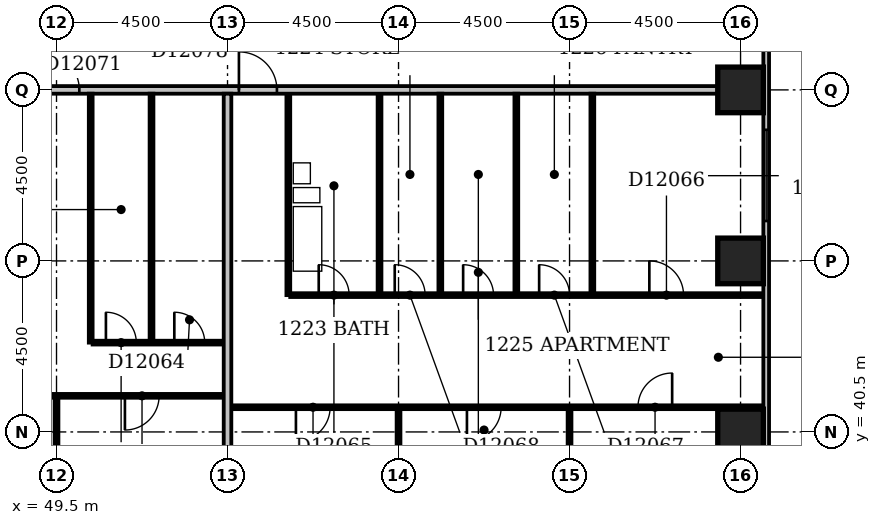
"""IFC4 building model, lengths in metres.
Left out: names, types, materials, properties, quantities, classifications, styles, units other than length and angle.
Written with IfcOpenShell. Run it as: python <this file> out.ifc"""

import sys

from ifc_helpers import new_model, si_unit, direction, frame, frame_2d, origin, origin_2d, place, context, subcontext, project, spatial, rectangle, extrude, element, fill, save


model = new_model("IFC4")
c1 = context("Model", 3, precision=1e-05, world=origin(), true_north=direction((0.0, 1.0)))
c2 = subcontext(c1, "Body", "Model", "MODEL_VIEW")
j1 = project(units=[si_unit("LENGTHUNIT", "METRE"), si_unit("PLANEANGLEUNIT", "RADIAN")], contexts=[c1])
p1 = place(None, origin())
s1 = spatial("IfcSite", under=j1, at=p1, CompositionType="ELEMENT")
p2 = place(p1, origin())
s2 = spatial("IfcBuilding", under=s1, at=p2, CompositionType="ELEMENT")
p3 = place(p2, frame((0.0, 0.0, 54.2)))
s3 = spatial("IfcBuildingStorey", under=s2, at=p3, CompositionType="ELEMENT", Elevation=54.2)
for number, where, z_axis, x_axis in (
    (1, (67.5, 40.5, -0.3), (0.0, 0.0, 1.0), (1.0, 0.0, 0.0)),
    (2, (67.5, 45.0, -0.3), (0.0, 0.0, 1.0), (1.0, 0.0, 0.0)),
    (3, (67.5, 49.5, -0.3), (0.0, 0.0, 1.0), (1.0, 0.0, 0.0)),
):
    element("IfcColumn", number, at=place(p3, frame(where, z_axis=z_axis, x_axis=x_axis)), inside=s3, PredefinedType="COLUMN", context=c2, shape_type="SweptSolid", body=[
        extrude(rectangle(XDim=1.2, YDim=1.2, at=origin_2d()), origin(), (0.0, 0.0, 1.0), 3.6),
    ])
p4 = place(p3, frame((68.175, 35.4, 0.0), z_axis=(0.0, 0.0, 1.0), x_axis=(0.0, 1.0, 0.0)))
e4 = element("IfcWall", 4, at=p4, inside=s3, PredefinedType="STANDARD", context=c2, shape_type="SweptSolid", body=[
    extrude(rectangle(XDim=23.85, YDim=0.15, at=frame_2d((11.925, 0.0))), origin(), (0.0, 0.0, 1.0), 2.7),
])
p5 = place(p4, frame((1.53, 0.0, 0.6)))
e5 = element("IfcOpeningElement", 5, at=p5, cuts=e4, PredefinedType="OPENING", context=c2, shape_type="SweptSolid", body=[
    extrude(rectangle(XDim=1.5, YDim=1.8, at=frame_2d((0.75, 0.9))), frame((0.0, 0.087, 0.0), z_axis=(0.0, -1.0, 0.0), x_axis=(1.0, 0.0, 0.0)), (0.0, 0.0, 1.0), 0.174),
])
p6 = place(p4, frame((10.65, 0.0, 0.6)))
e6 = element("IfcOpeningElement", 6, at=p6, cuts=e4, PredefinedType="OPENING", context=c2, shape_type="SweptSolid", body=[
    extrude(rectangle(XDim=2.4, YDim=1.8, at=frame_2d((1.2, 0.9))), frame((0.0, 0.087, 0.0), z_axis=(0.0, -1.0, 0.0), x_axis=(1.0, 0.0, 0.0)), (0.0, 0.0, 1.0), 0.174),
])
p7 = place(p4, frame((19.47, 0.0, 0.6)))
e7 = element("IfcOpeningElement", 7, at=p7, cuts=e4, PredefinedType="OPENING", context=c2, shape_type="SweptSolid", body=[
    extrude(rectangle(XDim=0.45, YDim=1.8, at=frame_2d((0.225, 0.9))), frame((0.0, 0.087, 0.0), z_axis=(0.0, -1.0, 0.0), x_axis=(1.0, 0.0, 0.0)), (0.0, 0.0, 1.0), 0.174),
])
p8 = place(p4, frame((21.601, 0.0, 0.6)))
e8 = element("IfcOpeningElement", 8, at=p8, cuts=e4, PredefinedType="OPENING", context=c2, shape_type="SweptSolid", body=[
    extrude(rectangle(XDim=0.6, YDim=1.8, at=frame_2d((0.3, 0.9))), frame((0.0, 0.087, 0.0), z_axis=(0.0, -1.0, 0.0), x_axis=(1.0, 0.0, 0.0)), (0.0, 0.0, 1.0), 0.174),
])
p9 = place(p3, frame((49.5, 36.6, 0.0), z_axis=(0.0, 0.0, 1.0), x_axis=(0.0, 1.0, 0.0)))
e9 = element("IfcWall", 9, at=p9, inside=s3, PredefinedType="PARTITIONING", context=c2, shape_type="SweptSolid", body=[
    extrude(rectangle(XDim=4.8, YDim=0.1, at=frame_2d((2.4, 0.0))), origin(), (0.0, 0.0, 1.0), 3.3),
])
p10 = place(p3, frame((54.0, 36.6, 0.0), z_axis=(0.0, 0.0, 1.0), x_axis=(0.0, 1.0, 0.0)))
e10 = element("IfcWall", 10, at=p10, inside=s3, PredefinedType="PARTITIONING", context=c2, shape_type="SweptSolid", body=[
    extrude(rectangle(XDim=12.8, YDim=0.2, at=frame_2d((6.4, 0.0))), origin(), (0.0, 0.0, 1.0), 2.6),
])
p11 = place(p3, frame((58.5, 36.6, 0.0), z_axis=(0.0, 0.0, 1.0), x_axis=(0.0, 1.0, 0.0)))
e11 = element("IfcWall", 11, at=p11, inside=s3, PredefinedType="PARTITIONING", context=c2, shape_type="SweptSolid", body=[
    extrude(rectangle(XDim=4.5, YDim=0.1, at=frame_2d((2.25, 0.0))), origin(), (0.0, 0.0, 1.0), 3.3),
])
p12 = place(p3, frame((63.0, 36.6, 0.0), z_axis=(0.0, 0.0, 1.0), x_axis=(0.0, 1.0, 0.0)))
e12 = element("IfcWall", 12, at=p12, inside=s3, PredefinedType="PARTITIONING", context=c2, shape_type="SweptSolid", body=[
    extrude(rectangle(XDim=4.5, YDim=0.1, at=frame_2d((2.25, 0.0))), origin(), (0.0, 0.0, 1.0), 2.4),
])
p13 = place(p3, frame((54.1, 41.15, 0.0), z_axis=(0.0, 0.0, 1.0), x_axis=(1.0, 0.0, 0.0)))
e13 = element("IfcWall", 13, at=p13, inside=s3, PredefinedType="PARTITIONING", context=c2, shape_type="SweptSolid", body=[
    extrude(rectangle(XDim=14.0, YDim=0.1, at=frame_2d((7.0, 0.0))), origin(), (0.0, 0.0, 1.0), 3.3),
])
p14 = place(p13, frame((1.7, 0.0, 0.0)))
e14 = element("IfcOpeningElement", 14, at=p14, cuts=e13, PredefinedType="OPENING", context=c2, shape_type="SweptSolid", body=[
    extrude(rectangle(XDim=0.9, YDim=2.1, at=frame_2d((0.45, 1.05))), frame((0.0, 0.062, 0.0), z_axis=(0.0, -1.0, 0.0), x_axis=(1.0, 0.0, 0.0)), (0.0, 0.0, 1.0), 0.124),
])
p15 = place(p13, frame((6.2, 0.0, 0.0)))
e15 = element("IfcOpeningElement", 15, at=p15, cuts=e13, PredefinedType="OPENING", context=c2, shape_type="SweptSolid", body=[
    extrude(rectangle(XDim=0.9, YDim=2.1, at=frame_2d((0.45, 1.05))), frame((0.0, 0.062, 0.0), z_axis=(0.0, -1.0, 0.0), x_axis=(1.0, 0.0, 0.0)), (0.0, 0.0, 1.0), 0.124),
])
p16 = place(p13, frame((10.7, 0.0, 0.0)))
e16 = element("IfcOpeningElement", 16, at=p16, cuts=e13, PredefinedType="OPENING", context=c2, shape_type="SweptSolid", body=[
    extrude(rectangle(XDim=0.9, YDim=2.1, at=frame_2d((0.45, 1.05))), frame((0.0, 0.062, 0.0), z_axis=(0.0, -1.0, 0.0), x_axis=(1.0, 0.0, 0.0)), (0.0, 0.0, 1.0), 0.124),
])
p17 = place(p3, frame((40.6, 41.45, 0.0), z_axis=(0.0, 0.0, 1.0), x_axis=(1.0, 0.0, 0.0)))
e17 = element("IfcWall", 17, at=p17, inside=s3, PredefinedType="PARTITIONING", context=c2, shape_type="SweptSolid", body=[
    extrude(rectangle(XDim=13.3, YDim=0.1, at=frame_2d((6.65, 0.0))), origin(), (0.0, 0.0, 1.0), 3.3),
])
p18 = place(p17, frame((1.7, 0.0, 0.0)))
e18 = element("IfcOpeningElement", 18, at=p18, cuts=e17, PredefinedType="OPENING", context=c2, shape_type="SweptSolid", body=[
    extrude(rectangle(XDim=0.9, YDim=2.1, at=frame_2d((0.45, 1.05))), frame((0.0, 0.062, 0.0), z_axis=(0.0, -1.0, 0.0), x_axis=(1.0, 0.0, 0.0)), (0.0, 0.0, 1.0), 0.124),
])
p19 = place(p17, frame((6.2, 0.0, 0.0)))
e19 = element("IfcOpeningElement", 19, at=p19, cuts=e17, PredefinedType="OPENING", context=c2, shape_type="SweptSolid", body=[
    extrude(rectangle(XDim=0.9, YDim=2.1, at=frame_2d((0.45, 1.05))), frame((0.0, 0.062, 0.0), z_axis=(0.0, -1.0, 0.0), x_axis=(1.0, 0.0, 0.0)), (0.0, 0.0, 1.0), 0.124),
])
p20 = place(p17, frame((10.7, 0.0, 0.0)))
e20 = element("IfcOpeningElement", 20, at=p20, cuts=e17, PredefinedType="OPENING", context=c2, shape_type="SweptSolid", body=[
    extrude(rectangle(XDim=0.9, YDim=2.1, at=frame_2d((0.45, 1.05))), frame((0.0, 0.062, 0.0), z_axis=(0.0, -1.0, 0.0), x_axis=(1.0, 0.0, 0.0)), (0.0, 0.0, 1.0), 0.124),
])
p21 = place(p3, frame((50.4, 42.85, 0.0), z_axis=(0.0, 0.0, 1.0), x_axis=(0.0, 1.0, 0.0)))
e21 = element("IfcWall", 21, at=p21, inside=s3, PredefinedType="PARTITIONING", context=c2, shape_type="SweptSolid", body=[
    extrude(rectangle(XDim=6.55, YDim=0.1, at=frame_2d((3.275, 0.0))), origin(), (0.0, 0.0, 1.0), 3.3),
])
p22 = place(p3, frame((50.45, 42.85, 0.0), z_axis=(0.0, 0.0, 1.0), x_axis=(1.0, 0.0, 0.0)))
e22 = element("IfcWall", 22, at=p22, inside=s3, PredefinedType="PARTITIONING", context=c2, shape_type="SweptSolid", body=[
    extrude(rectangle(XDim=3.45, YDim=0.1, at=frame_2d((1.725, 0.0))), origin(), (0.0, 0.0, 1.0), 3.3),
])
p23 = place(p22, frame((0.35, 0.0, 0.0)))
e23 = element("IfcOpeningElement", 23, at=p23, cuts=e22, PredefinedType="OPENING", context=c2, shape_type="SweptSolid", body=[
    extrude(rectangle(XDim=0.8, YDim=2.1, at=frame_2d((0.4, 1.05))), frame((0.0, 0.062, 0.0), z_axis=(0.0, -1.0, 0.0), x_axis=(1.0, 0.0, 0.0)), (0.0, 0.0, 1.0), 0.124),
])
p24 = place(p22, frame((2.15, 0.0, 0.0)))
e24 = element("IfcOpeningElement", 24, at=p24, cuts=e22, PredefinedType="OPENING", context=c2, shape_type="SweptSolid", body=[
    extrude(rectangle(XDim=0.8, YDim=2.1, at=frame_2d((0.4, 1.05))), frame((0.0, 0.062, 0.0), z_axis=(0.0, -1.0, 0.0), x_axis=(1.0, 0.0, 0.0)), (0.0, 0.0, 1.0), 0.124),
])
p25 = place(p3, frame((52.0, 42.9, 0.0), z_axis=(0.0, 0.0, 1.0), x_axis=(0.0, 1.0, 0.0)))
e25 = element("IfcWall", 25, at=p25, inside=s3, PredefinedType="PARTITIONING", context=c2, shape_type="SweptSolid", body=[
    extrude(rectangle(XDim=6.5, YDim=0.1, at=frame_2d((3.25, 0.0))), origin(), (0.0, 0.0, 1.0), 3.3),
])
p26 = place(p3, frame((55.6, 44.1, 0.0), z_axis=(0.0, 0.0, 1.0), x_axis=(0.0, 1.0, 0.0)))
e26 = element("IfcWall", 26, at=p26, inside=s3, PredefinedType="PLUMBINGWALL", context=c2, shape_type="SweptSolid", body=[
    extrude(rectangle(XDim=5.3, YDim=0.1, at=frame_2d((2.65, 0.0))), origin(), (0.0, 0.0, 1.0), 3.3),
])
p27 = place(p3, frame((55.65, 44.1, 0.0), z_axis=(0.0, 0.0, 1.0), x_axis=(1.0, 0.0, 0.0)))
e27 = element("IfcWall", 27, at=p27, inside=s3, PredefinedType="PARTITIONING", context=c2, shape_type="SweptSolid", body=[
    extrude(rectangle(XDim=12.45, YDim=0.1, at=frame_2d((6.225, 0.0))), origin(), (0.0, 0.0, 1.0), 3.3),
])
p28 = place(p27, frame((0.75, 0.0, 0.0)))
e28 = element("IfcOpeningElement", 28, at=p28, cuts=e27, PredefinedType="OPENING", context=c2, shape_type="SweptSolid", body=[
    extrude(rectangle(XDim=0.8, YDim=2.1, at=frame_2d((0.4, 1.05))), frame((0.0, 0.062, 0.0), z_axis=(0.0, -1.0, 0.0), x_axis=(1.0, 0.0, 0.0)), (0.0, 0.0, 1.0), 0.124),
])
p29 = place(p27, frame((9.45, 0.0, 0.0)))
e29 = element("IfcOpeningElement", 29, at=p29, cuts=e27, PredefinedType="OPENING", context=c2, shape_type="SweptSolid", body=[
    extrude(rectangle(XDim=0.9, YDim=2.1, at=frame_2d((0.45, 1.05))), frame((0.0, 0.062, 0.0), z_axis=(0.0, -1.0, 0.0), x_axis=(1.0, 0.0, 0.0)), (0.0, 0.0, 1.0), 0.124),
])
p30 = place(p27, frame((6.55, 0.0, 0.0)))
e30 = element("IfcOpeningElement", 30, at=p30, cuts=e27, PredefinedType="OPENING", context=c2, shape_type="SweptSolid", body=[
    extrude(rectangle(XDim=0.8, YDim=2.1, at=frame_2d((0.4, 1.05))), frame((0.0, 0.062, 0.0), z_axis=(0.0, -1.0, 0.0), x_axis=(1.0, 0.0, 0.0)), (0.0, 0.0, 1.0), 0.124),
])
p31 = place(p27, frame((2.75, 0.0, 0.0)))
e31 = element("IfcOpeningElement", 31, at=p31, cuts=e27, PredefinedType="OPENING", context=c2, shape_type="SweptSolid", body=[
    extrude(rectangle(XDim=0.8, YDim=2.1, at=frame_2d((0.4, 1.05))), frame((0.0, 0.062, 0.0), z_axis=(0.0, -1.0, 0.0), x_axis=(1.0, 0.0, 0.0)), (0.0, 0.0, 1.0), 0.124),
])
p32 = place(p27, frame((4.55, 0.0, 0.0)))
e32 = element("IfcOpeningElement", 32, at=p32, cuts=e27, PredefinedType="OPENING", context=c2, shape_type="SweptSolid", body=[
    extrude(rectangle(XDim=0.8, YDim=2.1, at=frame_2d((0.4, 1.05))), frame((0.0, 0.062, 0.0), z_axis=(0.0, -1.0, 0.0), x_axis=(1.0, 0.0, 0.0)), (0.0, 0.0, 1.0), 0.124),
])
p33 = place(p3, frame((58.0, 44.15, 0.0), z_axis=(0.0, 0.0, 1.0), x_axis=(0.0, 1.0, 0.0)))
e33 = element("IfcWall", 33, at=p33, inside=s3, PredefinedType="PLUMBINGWALL", context=c2, shape_type="SweptSolid", body=[
    extrude(rectangle(XDim=5.25, YDim=0.1, at=frame_2d((2.625, 0.0))), origin(), (0.0, 0.0, 1.0), 3.3),
])
for number, where, z_axis, x_axis in (
    (34, (59.6, 44.15, 0.0), (0.0, 0.0, 1.0), (0.0, 1.0, 0.0)),
    (35, (61.6, 44.15, 0.0), (0.0, 0.0, 1.0), (0.0, 1.0, 0.0)),
):
    element("IfcWall", number, at=place(p3, frame(where, z_axis=z_axis, x_axis=x_axis)), inside=s3, PredefinedType="PARTITIONING", context=c2, shape_type="SweptSolid", body=[
        extrude(rectangle(XDim=5.25, YDim=0.1, at=frame_2d((2.625, 0.0))), origin(), (0.0, 0.0, 1.0), 3.3),
    ])
p34 = place(p3, frame((63.6, 44.15, 0.0), z_axis=(0.0, 0.0, 1.0), x_axis=(0.0, 1.0, 0.0)))
e36 = element("IfcWall", 36, at=p34, inside=s3, PredefinedType="PARTITIONING", context=c2, shape_type="SweptSolid", body=[
    extrude(rectangle(XDim=5.25, YDim=0.1, at=frame_2d((2.625, 0.0))), origin(), (0.0, 0.0, 1.0), 2.4),
])
p35 = place(p3, frame((9.1, 49.5, 0.0), z_axis=(0.0, 0.0, 1.0), x_axis=(1.0, 0.0, 0.0)))
e37 = element("IfcWall", 37, at=p35, inside=s3, PredefinedType="PARTITIONING", context=c2, shape_type="SweptSolid", body=[
    extrude(rectangle(XDim=57.8, YDim=0.2, at=frame_2d((28.9, 0.0))), origin(), (0.0, 0.0, 1.0), 3.3),
])
p36 = place(p35, frame((16.1, 0.0, 0.0)))
e38 = element("IfcOpeningElement", 38, at=p36, cuts=e37, PredefinedType="OPENING", context=c2, shape_type="SweptSolid", body=[
    extrude(rectangle(XDim=1.0, YDim=2.1, at=frame_2d((0.5, 1.05))), frame((0.0, 0.112, 0.0), z_axis=(0.0, -1.0, 0.0), x_axis=(1.0, 0.0, 0.0)), (0.0, 0.0, 1.0), 0.224),
])
p37 = place(p35, frame((40.0, 0.0, 0.0)))
e39 = element("IfcOpeningElement", 39, at=p37, cuts=e37, PredefinedType="OPENING", context=c2, shape_type="SweptSolid", body=[
    extrude(rectangle(XDim=1.0, YDim=2.1, at=frame_2d((0.5, 1.05))), frame((0.0, 0.112, 0.0), z_axis=(0.0, -1.0, 0.0), x_axis=(1.0, 0.0, 0.0)), (0.0, 0.0, 1.0), 0.224),
])
p38 = place(p35, frame((45.2, 0.0, 0.0)))
e40 = element("IfcOpeningElement", 40, at=p38, cuts=e37, PredefinedType="OPENING", context=c2, shape_type="SweptSolid", body=[
    extrude(rectangle(XDim=1.0, YDim=2.1, at=frame_2d((0.5, 1.05))), frame((0.0, 0.112, 0.0), z_axis=(0.0, -1.0, 0.0), x_axis=(1.0, 0.0, 0.0)), (0.0, 0.0, 1.0), 0.224),
])
p39 = place(p35, frame((3.9, 0.0, 0.0)))
e41 = element("IfcOpeningElement", 41, at=p39, cuts=e37, PredefinedType="OPENING", context=c2, shape_type="SweptSolid", body=[
    extrude(rectangle(XDim=0.9, YDim=2.1, at=frame_2d((0.45, 1.05))), frame((0.0, 0.112, 0.0), z_axis=(0.0, -1.0, 0.0), x_axis=(1.0, 0.0, 0.0)), (0.0, 0.0, 1.0), 0.224),
])
p40 = place(p6, origin())
e42 = element("IfcWindow", 42, at=p40, inside=s3, PartitioningType="SINGLE_PANEL", PredefinedType="WINDOW", context=c2, shape_type="SweptSolid", body=[
    extrude(rectangle(XDim=2.4, YDim=1.8, at=frame_2d((1.2, 0.9))), frame((0.0, 0.03, 0.0), z_axis=(0.0, -1.0, 0.0), x_axis=(1.0, 0.0, 0.0)), (0.0, 0.0, 1.0), 0.06),
])
fill(e6, e42)
p41 = place(p14, frame((0.9, 0.0, 0.0), z_axis=(0.0, 0.0, 1.0), x_axis=(-1.0, 0.0, 0.0)))
e43 = element("IfcDoor", 43, at=p41, inside=s3, OperationType="SINGLE_SWING_RIGHT", PredefinedType="DOOR", context=c2, shape_type="SweptSolid", body=[
    extrude(rectangle(XDim=0.9, YDim=2.1, at=frame_2d((0.45, 1.05))), frame((0.0, 0.025, 0.0), z_axis=(0.0, -1.0, 0.0), x_axis=(1.0, 0.0, 0.0)), (0.0, 0.0, 1.0), 0.05),
])
fill(e14, e43)
p42 = place(p15, frame((0.9, 0.0, 0.0), z_axis=(0.0, 0.0, 1.0), x_axis=(-1.0, 0.0, 0.0)))
e44 = element("IfcDoor", 44, at=p42, inside=s3, OperationType="SINGLE_SWING_RIGHT", PredefinedType="DOOR", context=c2, shape_type="SweptSolid", body=[
    extrude(rectangle(XDim=0.9, YDim=2.1, at=frame_2d((0.45, 1.05))), frame((0.0, 0.025, 0.0), z_axis=(0.0, -1.0, 0.0), x_axis=(1.0, 0.0, 0.0)), (0.0, 0.0, 1.0), 0.05),
])
fill(e15, e44)
p43 = place(p16, frame((0.9, 0.0, 0.0), z_axis=(0.0, 0.0, 1.0), x_axis=(-1.0, 0.0, 0.0)))
e45 = element("IfcDoor", 45, at=p43, inside=s3, OperationType="SINGLE_SWING_LEFT", PredefinedType="DOOR", context=c2, shape_type="SweptSolid", body=[
    extrude(rectangle(XDim=0.9, YDim=2.1, at=frame_2d((0.45, 1.05))), frame((0.0, 0.025, 0.0), z_axis=(0.0, -1.0, 0.0), x_axis=(1.0, 0.0, 0.0)), (0.0, 0.0, 1.0), 0.05),
])
fill(e16, e45)
p44 = place(p20, frame((0.9, 0.0, 0.0), z_axis=(0.0, 0.0, 1.0), x_axis=(-1.0, 0.0, 0.0)))
e46 = element("IfcDoor", 46, at=p44, inside=s3, OperationType="SINGLE_SWING_RIGHT", PredefinedType="DOOR", context=c2, shape_type="SweptSolid", body=[
    extrude(rectangle(XDim=0.9, YDim=2.1, at=frame_2d((0.45, 1.05))), frame((0.0, 0.025, 0.0), z_axis=(0.0, -1.0, 0.0), x_axis=(1.0, 0.0, 0.0)), (0.0, 0.0, 1.0), 0.05),
])
fill(e20, e46)
p45 = place(p23, origin())
e47 = element("IfcDoor", 47, at=p45, inside=s3, OperationType="SINGLE_SWING_LEFT", PredefinedType="DOOR", context=c2, shape_type="SweptSolid", body=[
    extrude(rectangle(XDim=0.8, YDim=2.1, at=frame_2d((0.4, 1.05))), frame((0.0, 0.025, 0.0), z_axis=(0.0, -1.0, 0.0), x_axis=(1.0, 0.0, 0.0)), (0.0, 0.0, 1.0), 0.05),
])
fill(e23, e47)
p46 = place(p24, origin())
e48 = element("IfcDoor", 48, at=p46, inside=s3, OperationType="SINGLE_SWING_LEFT", PredefinedType="DOOR", context=c2, shape_type="SweptSolid", body=[
    extrude(rectangle(XDim=0.8, YDim=2.1, at=frame_2d((0.4, 1.05))), frame((0.0, 0.025, 0.0), z_axis=(0.0, -1.0, 0.0), x_axis=(1.0, 0.0, 0.0)), (0.0, 0.0, 1.0), 0.05),
])
fill(e24, e48)
p47 = place(p28, origin())
e49 = element("IfcDoor", 49, at=p47, inside=s3, OperationType="SINGLE_SWING_LEFT", PredefinedType="DOOR", context=c2, shape_type="SweptSolid", body=[
    extrude(rectangle(XDim=0.8, YDim=2.1, at=frame_2d((0.4, 1.05))), frame((0.0, 0.025, 0.0), z_axis=(0.0, -1.0, 0.0), x_axis=(1.0, 0.0, 0.0)), (0.0, 0.0, 1.0), 0.05),
])
fill(e28, e49)
p48 = place(p29, origin())
e50 = element("IfcDoor", 50, at=p48, inside=s3, OperationType="SINGLE_SWING_LEFT", PredefinedType="DOOR", context=c2, shape_type="SweptSolid", body=[
    extrude(rectangle(XDim=0.9, YDim=2.1, at=frame_2d((0.45, 1.05))), frame((0.0, 0.025, 0.0), z_axis=(0.0, -1.0, 0.0), x_axis=(1.0, 0.0, 0.0)), (0.0, 0.0, 1.0), 0.05),
])
fill(e29, e50)
p49 = place(p30, origin())
e51 = element("IfcDoor", 51, at=p49, inside=s3, OperationType="SINGLE_SWING_LEFT", PredefinedType="DOOR", context=c2, shape_type="SweptSolid", body=[
    extrude(rectangle(XDim=0.8, YDim=2.1, at=frame_2d((0.4, 1.05))), frame((0.0, 0.025, 0.0), z_axis=(0.0, -1.0, 0.0), x_axis=(1.0, 0.0, 0.0)), (0.0, 0.0, 1.0), 0.05),
])
fill(e30, e51)
p50 = place(p31, origin())
e52 = element("IfcDoor", 52, at=p50, inside=s3, OperationType="SINGLE_SWING_LEFT", PredefinedType="DOOR", context=c2, shape_type="SweptSolid", body=[
    extrude(rectangle(XDim=0.8, YDim=2.1, at=frame_2d((0.4, 1.05))), frame((0.0, 0.025, 0.0), z_axis=(0.0, -1.0, 0.0), x_axis=(1.0, 0.0, 0.0)), (0.0, 0.0, 1.0), 0.05),
])
fill(e31, e52)
p51 = place(p32, origin())
e53 = element("IfcDoor", 53, at=p51, inside=s3, OperationType="SINGLE_SWING_LEFT", PredefinedType="DOOR", context=c2, shape_type="SweptSolid", body=[
    extrude(rectangle(XDim=0.8, YDim=2.1, at=frame_2d((0.4, 1.05))), frame((0.0, 0.025, 0.0), z_axis=(0.0, -1.0, 0.0), x_axis=(1.0, 0.0, 0.0)), (0.0, 0.0, 1.0), 0.05),
])
fill(e32, e53)
p52 = place(p37, origin())
e54 = element("IfcDoor", 54, at=p52, inside=s3, OperationType="SINGLE_SWING_LEFT", PredefinedType="DOOR", context=c2, shape_type="SweptSolid", body=[
    extrude(rectangle(XDim=1.0, YDim=2.1, at=frame_2d((0.5, 1.05))), frame((0.0, 0.025, 0.0), z_axis=(0.0, -1.0, 0.0), x_axis=(1.0, 0.0, 0.0)), (0.0, 0.0, 1.0), 0.05),
])
fill(e39, e54)
p53 = place(p38, origin())
e55 = element("IfcDoor", 55, at=p53, inside=s3, OperationType="SINGLE_SWING_LEFT", PredefinedType="DOOR", context=c2, shape_type="SweptSolid", body=[
    extrude(rectangle(XDim=1.0, YDim=2.1, at=frame_2d((0.5, 1.05))), frame((0.0, 0.025, 0.0), z_axis=(0.0, -1.0, 0.0), x_axis=(1.0, 0.0, 0.0)), (0.0, 0.0, 1.0), 0.05),
])
fill(e40, e55)
save(model, sys.argv[1])
